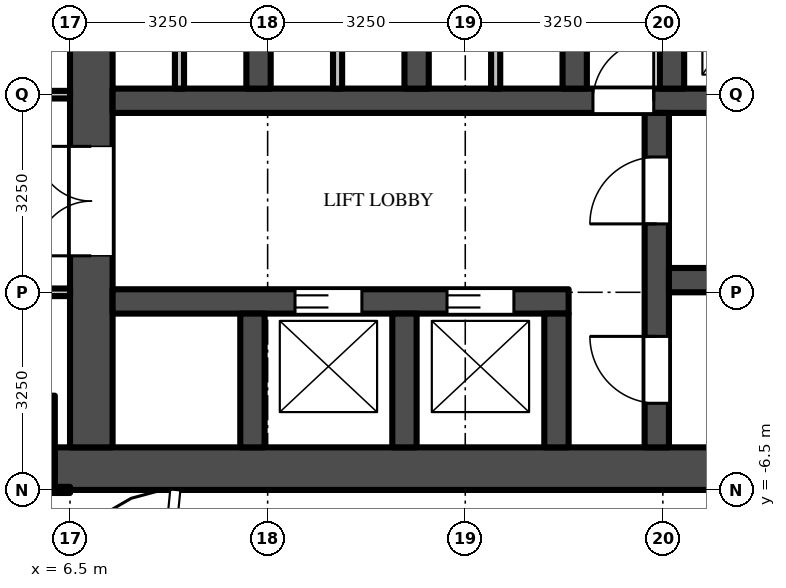
"""IFC4 building model, lengths in metres.
Left out: names, types, materials, properties, quantities, classifications, styles, units other than length and angle.
Written with IfcOpenShell. Run it as: python <this file> out.ifc"""

import sys

from ifc_helpers import new_model, si_unit, direction, frame, frame_2d, origin, origin_2d, place, context, subcontext, project, spatial, rectangle, extrude, source, transform, mapped, element, fill, save


model = new_model("IFC4")
c1 = context("Model", 3, precision=1e-05, world=origin(), true_north=direction((0.0, 1.0)))
c2 = subcontext(c1, "Body", "Model", "MODEL_VIEW")
j1 = project(units=[si_unit("LENGTHUNIT", "METRE"), si_unit("PLANEANGLEUNIT", "RADIAN")], contexts=[c1])
p1 = place(None, origin())
s1 = spatial("IfcSite", under=j1, at=p1, CompositionType="ELEMENT")
p2 = place(p1, origin())
s2 = spatial("IfcBuilding", under=s1, at=p2, CompositionType="ELEMENT")
p3 = place(p2, frame((0.0, 0.0, 142.5)))
s3 = spatial("IfcBuildingStorey", under=s2, at=p3, CompositionType="ELEMENT", Elevation=142.5)
m1 = source(origin(), c2, "Body", "SweptSolid", [
    extrude(rectangle(XDim=1.3, YDim=1.3, at=origin_2d()), origin(), (0.0, 0.0, 1.0), 4.5),
])
p4 = place(p3, frame((5.6, -5.6, 0.0), z_axis=(0.0, 0.0, 1.0), x_axis=(1.0, 0.0, 0.0)))
e1 = element("IfcColumn", 1, at=p4, inside=s3, PredefinedType="COLUMN", context=c2, shape_type="MappedRepresentation", body=[
    mapped(m1, transform((0.0, 0.0, 0.0))),
])
m2 = source(origin(), c2, "Body", "SweptSolid", [
    extrude(rectangle(XDim=16.5, YDim=0.7, at=frame_2d((8.25, 0.0))), origin(), (0.0, 0.0, 1.0), 4.25),
])
p5 = place(p3, frame((6.25, -6.15, 0.0), z_axis=(0.0, 0.0, 1.0), x_axis=(1.0, 0.0, 0.0)))
e2 = element("IfcWall", 2, at=p5, inside=s3, PredefinedType="SHEAR", context=c2, shape_type="MappedRepresentation", body=[
    mapped(m2, transform((0.0, 0.0, 0.0))),
])
m3 = source(origin(), c2, "Body", "SweptSolid", [
    extrude(rectangle(XDim=9.05, YDim=0.7, at=frame_2d((4.525, 0.0))), origin(), (0.0, 0.0, 1.0), 4.25),
])
p6 = place(p3, frame((6.85, -5.8, 0.0), z_axis=(0.0, 0.0, 1.0), x_axis=(0.0, 1.0, 0.0)))
e3 = element("IfcWall", 3, at=p6, inside=s3, PredefinedType="SHEAR", context=c2, shape_type="MappedRepresentation", body=[
    mapped(m3, transform((0.0, 0.0, 0.0))),
])
m4 = source(origin(), c2, "Body", "SweptSolid", [
    extrude(rectangle(XDim=1.8, YDim=2.1, at=frame_2d((0.9, 1.05))), frame((0.0, 0.36, 0.0), z_axis=(0.0, -1.0, 0.0), x_axis=(1.0, 0.0, 0.0)), (0.0, 0.0, 1.0), 0.72),
])
p7 = place(p6, frame((3.15, 0.0, 0.0)))
e4 = element("IfcOpeningElement", 4, at=p7, cuts=e3, PredefinedType="OPENING", context=c2, shape_type="MappedRepresentation", body=[
    mapped(m4, transform((0.0, 0.0, 0.0))),
])
m5 = source(origin(), c2, "Body", "SweptSolid", [
    extrude(rectangle(XDim=7.5, YDim=0.4, at=frame_2d((3.75, 0.0))), origin(), (0.0, 0.0, 1.0), 4.25),
])
p8 = place(p3, frame((7.2, -3.4, 0.0), z_axis=(0.0, 0.0, 1.0), x_axis=(1.0, 0.0, 0.0)))
e5 = element("IfcWall", 5, at=p8, inside=s3, PredefinedType="SHEAR", context=c2, shape_type="MappedRepresentation", body=[
    mapped(m5, transform((0.0, 0.0, 0.0))),
])
m6 = source(origin(), c2, "Body", "SweptSolid", [
    extrude(rectangle(XDim=1.1, YDim=2.1, at=frame_2d((0.55, 1.05))), frame((0.0, 0.21, 0.0), z_axis=(0.0, -1.0, 0.0), x_axis=(1.0, 0.0, 0.0)), (0.0, 0.0, 1.0), 0.42),
])
p9 = place(p8, frame((3.0, 0.0, 0.0)))
e6 = element("IfcOpeningElement", 6, at=p9, cuts=e5, PredefinedType="OPENING", context=c2, shape_type="MappedRepresentation", body=[
    mapped(m6, transform((0.0, 0.0, 0.0))),
])
p10 = place(p8, frame((5.5, 0.0, 0.0)))
e7 = element("IfcOpeningElement", 7, at=p10, cuts=e5, PredefinedType="OPENING", context=c2, shape_type="MappedRepresentation", body=[
    mapped(m6, transform((0.0, 0.0, 0.0))),
])
m7 = source(origin(), c2, "Body", "SweptSolid", [
    extrude(rectangle(XDim=14.85, YDim=0.4, at=frame_2d((7.425, 0.0))), origin(), (0.0, 0.0, 1.0), 4.25),
])
p11 = place(p3, frame((7.2, -0.1, 0.0), z_axis=(0.0, 0.0, 1.0), x_axis=(1.0, 0.0, 0.0)))
e8 = element("IfcWall", 8, at=p11, inside=s3, PredefinedType="SHEAR", context=c2, shape_type="MappedRepresentation", body=[
    mapped(m7, transform((0.0, 0.0, 0.0))),
])
m8 = source(origin(), c2, "Body", "SweptSolid", [
    extrude(rectangle(XDim=1.0, YDim=2.1, at=frame_2d((0.5, 1.05))), frame((0.0, 0.21, 0.0), z_axis=(0.0, -1.0, 0.0), x_axis=(1.0, 0.0, 0.0)), (0.0, 0.0, 1.0), 0.42),
])
p12 = place(p11, frame((7.9, 0.0, 0.0)))
e9 = element("IfcOpeningElement", 9, at=p12, cuts=e8, PredefinedType="OPENING", context=c2, shape_type="MappedRepresentation", body=[
    mapped(m8, transform((0.0, 0.0, 0.0))),
])
m9 = source(origin(), c2, "Body", "SweptSolid", [
    extrude(rectangle(XDim=5.5, YDim=0.4, at=frame_2d((2.75, 0.0))), origin(), (0.0, 0.0, 1.0), 4.25),
])
p13 = place(p3, frame((16.15, -5.8, 0.0), z_axis=(0.0, 0.0, 1.0), x_axis=(0.0, 1.0, 0.0)))
e10 = element("IfcWall", 10, at=p13, inside=s3, PredefinedType="SHEAR", context=c2, shape_type="MappedRepresentation", body=[
    mapped(m9, transform((0.0, 0.0, 0.0))),
])
p14 = place(p13, frame((0.725, 0.0, 0.0)))
e11 = element("IfcOpeningElement", 11, at=p14, cuts=e10, PredefinedType="OPENING", context=c2, shape_type="MappedRepresentation", body=[
    mapped(m6, transform((0.0, 0.0, 0.0))),
])
p15 = place(p13, frame((3.675, 0.0, 0.0)))
e12 = element("IfcOpeningElement", 12, at=p15, cuts=e10, PredefinedType="OPENING", context=c2, shape_type="MappedRepresentation", body=[
    mapped(m6, transform((0.0, 0.0, 0.0))),
])
m10 = source(origin(), c2, "Body", "SweptSolid", [
    extrude(rectangle(XDim=5.7, YDim=0.4, at=frame_2d((2.85, 0.0))), origin(), (0.0, 0.0, 1.0), 4.25),
])
p16 = place(p3, frame((16.35, -3.05, 0.0), z_axis=(0.0, 0.0, 1.0), x_axis=(1.0, 0.0, 0.0)))
e13 = element("IfcWall", 13, at=p16, inside=s3, PredefinedType="SHEAR", context=c2, shape_type="MappedRepresentation", body=[
    mapped(m10, transform((0.0, 0.0, 0.0))),
])
m11 = source(origin(), c2, "Body", "SweptSolid", [
    extrude(rectangle(XDim=2.2, YDim=0.4, at=frame_2d((1.1, 0.0))), origin(), (0.0, 0.0, 1.0), 4.25),
])
for number, where, z_axis, x_axis in (
    (14, (9.5, -5.8, 0.0), (0.0, 0.0, 1.0), (0.0, 1.0, 0.0)),
    (15, (12.0, -5.8, 0.0), (0.0, 0.0, 1.0), (0.0, 1.0, 0.0)),
    (16, (14.5, -5.8, 0.0), (0.0, 0.0, 1.0), (0.0, 1.0, 0.0)),
):
    element("IfcWall", number, at=place(p3, frame(where, z_axis=z_axis, x_axis=x_axis)), inside=s3, PredefinedType="SHEAR", context=c2, shape_type="MappedRepresentation", body=[
        mapped(m11, transform((0.0, 0.0, 0.0))),
    ])
m12 = source(origin(), c2, "Body", "SweptSolid", [
    extrude(rectangle(XDim=2.45, YDim=0.4, at=frame_2d((1.225, 0.0))), origin(), (0.0, 0.0, 1.0), 4.25),
])
for number, where, z_axis, x_axis in (
    (17, (9.6, 0.1, 0.0), (0.0, 0.0, 1.0), (0.0, 1.0, 0.0)),
    (18, (12.2, 0.1, 0.0), (0.0, 0.0, 1.0), (0.0, 1.0, 0.0)),
    (19, (14.8, 0.1, 0.0), (0.0, 0.0, 1.0), (0.0, 1.0, 0.0)),
    (20, (16.4, 0.1, 0.0), (0.0, 0.0, 1.0), (0.0, 1.0, 0.0)),
):
    element("IfcWall", number, at=place(p3, frame(where, z_axis=z_axis, x_axis=x_axis)), inside=s3, PredefinedType="SHEAR", context=c2, shape_type="MappedRepresentation", body=[
        mapped(m12, transform((0.0, 0.0, 0.0))),
    ])
m13 = source(origin(), c2, "Body", "SweptSolid", [
    extrude(rectangle(XDim=2.45, YDim=0.15, at=frame_2d((1.225, 0.0))), origin(), (0.0, 0.0, 1.0), 4.25),
])
for number, where, z_axis, x_axis in (
    (21, (8.3, 0.1, 0.0), (0.0, 0.0, 1.0), (0.0, 1.0, 0.0)),
    (22, (10.9, 0.1, 0.0), (0.0, 0.0, 1.0), (0.0, 1.0, 0.0)),
    (23, (13.5, 0.1, 0.0), (0.0, 0.0, 1.0), (0.0, 1.0, 0.0)),
):
    element("IfcWall", number, at=place(p3, frame(where, z_axis=z_axis, x_axis=x_axis)), inside=s3, PredefinedType="PARTITIONING", context=c2, shape_type="MappedRepresentation", body=[
        mapped(m13, transform((0.0, 0.0, 0.0))),
    ])
m14 = source(origin(), c2, "Body", "SweptSolid", [
    extrude(rectangle(XDim=5.238, YDim=0.1, at=frame_2d((2.619, 0.0))), origin(), (0.0, 0.0, 1.0), 3.33),
])
p17 = place(p3, frame((1.262, -6.5, 0.0), z_axis=(0.0, 0.0, 1.0), x_axis=(1.0, 0.0, 0.0)))
e24 = element("IfcWall", 24, at=p17, inside=s3, PredefinedType="PARTITIONING", context=c2, shape_type="MappedRepresentation", body=[
    mapped(m14, transform((0.0, 0.0, 0.0))),
])
m15 = source(origin(), c2, "Body", "SweptSolid", [
    extrude(rectangle(XDim=5.363, YDim=0.125, at=frame_2d((2.681, 0.0))), origin(), (0.0, 0.0, 1.0), 3.468),
])
p18 = place(p3, frame((6.5, -3.25, 0.0), z_axis=(0.0, 0.0, 1.0), x_axis=(-1.0, 0.0, 0.0)))
e25 = element("IfcWall", 25, at=p18, inside=s3, PredefinedType="PARTITIONING", context=c2, shape_type="MappedRepresentation", body=[
    mapped(m15, transform((0.0, 0.0, 0.0))),
])
m16 = source(origin(), c2, "Body", "SweptSolid", [
    extrude(rectangle(XDim=1.1, YDim=2.1, at=frame_2d((0.55, 1.05))), frame((0.0, 0.073, 0.0), z_axis=(0.0, -1.0, 0.0), x_axis=(1.0, 0.0, 0.0)), (0.0, 0.0, 1.0), 0.145),
])
p19 = place(p18, frame((0.35, 0.0, 0.0)))
e26 = element("IfcOpeningElement", 26, at=p19, cuts=e25, PredefinedType="OPENING", context=c2, shape_type="MappedRepresentation", body=[
    mapped(m16, transform((0.0, 0.0, 0.0))),
])
p20 = place(p3, frame((6.5, 0.0, 0.0), z_axis=(0.0, 0.0, 1.0), x_axis=(-1.0, 0.0, 0.0)))
e27 = element("IfcWall", 27, at=p20, inside=s3, PredefinedType="PARTITIONING", context=c2, shape_type="MappedRepresentation", body=[
    mapped(m15, transform((0.0, 0.0, 0.0))),
])
m17 = source(origin(), c2, "Body", "SweptSolid", [
    extrude(rectangle(XDim=1.0, YDim=2.1, at=frame_2d((0.5, 1.05))), frame((0.0, 0.073, 0.0), z_axis=(0.0, -1.0, 0.0), x_axis=(1.0, 0.0, 0.0)), (0.0, 0.0, 1.0), 0.145),
])
p21 = place(p20, frame((3.95, 0.0, 0.0)))
e28 = element("IfcOpeningElement", 28, at=p21, cuts=e27, PredefinedType="OPENING", context=c2, shape_type="MappedRepresentation", body=[
    mapped(m17, transform((0.0, 0.0, 0.0))),
])
m18 = source(origin(), c2, "Body", "SweptSolid", [
    extrude(rectangle(XDim=1.1, YDim=2.1, at=frame_2d((0.55, 1.05))), frame((0.0, 0.025, 0.0), z_axis=(0.0, -1.0, 0.0), x_axis=(1.0, 0.0, 0.0)), (0.0, 0.0, 1.0), 0.05),
])
p22 = place(p9, origin())
e29 = element("IfcDoor", 29, at=p22, inside=s3, OperationType="DOUBLE_DOOR_SLIDING", PredefinedType="DOOR", context=c2, shape_type="MappedRepresentation", body=[
    mapped(m18, transform((0.0, 0.0, 0.0))),
])
fill(e6, e29)
p23 = place(p10, origin())
e30 = element("IfcDoor", 30, at=p23, inside=s3, OperationType="DOUBLE_DOOR_SLIDING", PredefinedType="DOOR", context=c2, shape_type="MappedRepresentation", body=[
    mapped(m18, transform((0.0, 0.0, 0.0))),
])
fill(e7, e30)
m19 = source(origin(), c2, "Body", "SweptSolid", [
    extrude(rectangle(XDim=1.8, YDim=2.1, at=frame_2d((0.9, 1.05))), frame((0.0, -0.275, 0.0), z_axis=(0.0, -1.0, 0.0), x_axis=(1.0, 0.0, 0.0)), (0.0, 0.0, 1.0), 0.05),
])
p24 = place(p7, origin())
e31 = element("IfcDoor", 31, at=p24, inside=s3, OperationType="DOUBLE_DOOR_SINGLE_SWING", PredefinedType="DOOR", context=c2, shape_type="MappedRepresentation", body=[
    mapped(m19, transform((0.0, 0.0, 0.0))),
])
fill(e4, e31)
p25 = place(p14, origin())
e32 = element("IfcDoor", 32, at=p25, inside=s3, OperationType="SINGLE_SWING_RIGHT", PredefinedType="DOOR", context=c2, shape_type="MappedRepresentation", body=[
    mapped(m18, transform((0.0, 0.0, 0.0))),
])
fill(e11, e32)
p26 = place(p15, origin())
e33 = element("IfcDoor", 33, at=p26, inside=s3, OperationType="SINGLE_SWING_LEFT", PredefinedType="DOOR", context=c2, shape_type="MappedRepresentation", body=[
    mapped(m18, transform((0.0, 0.0, 0.0))),
])
fill(e12, e33)
m20 = source(origin(), c2, "Body", "SweptSolid", [
    extrude(rectangle(XDim=1.0, YDim=2.1, at=frame_2d((0.5, 1.05))), frame((0.0, 0.025, 0.0), z_axis=(0.0, -1.0, 0.0), x_axis=(1.0, 0.0, 0.0)), (0.0, 0.0, 1.0), 0.05),
])
p27 = place(p12, origin())
e34 = element("IfcDoor", 34, at=p27, inside=s3, OperationType="SINGLE_SWING_RIGHT", PredefinedType="DOOR", context=c2, shape_type="MappedRepresentation", body=[
    mapped(m20, transform((0.0, 0.0, 0.0))),
])
fill(e9, e34)
save(model, sys.argv[1])
